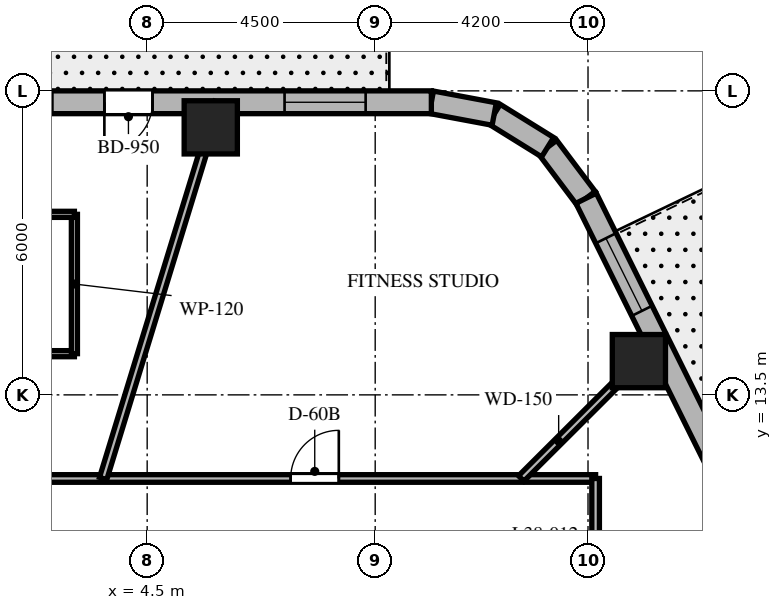
"""IFC4 building model, lengths in metres.
Left out: names, types, materials, properties, quantities, classifications, styles, units other than length and angle.
Written with IfcOpenShell. Run it as: python <this file> out.ifc"""

import sys

from ifc_helpers import new_model, si_unit, direction, frame, frame_2d, origin, origin_2d, place, context, subcontext, project, spatial, rectangle, extrude, element, fill, save


model = new_model("IFC4")
c1 = context("Model", 3, precision=1e-05, world=origin(), true_north=direction((0.0, 1.0)))
c2 = subcontext(c1, "Body", "Model", "MODEL_VIEW")
j1 = project(units=[si_unit("LENGTHUNIT", "METRE"), si_unit("PLANEANGLEUNIT", "RADIAN")], contexts=[c1])
p1 = place(None, origin())
s1 = spatial("IfcSite", under=j1, at=p1, CompositionType="ELEMENT")
p2 = place(p1, origin())
s2 = spatial("IfcBuilding", under=s1, at=p2, CompositionType="ELEMENT")
p3 = place(p2, frame((0.0, 0.0, 155.4)))
s3 = spatial("IfcBuildingStorey", under=s2, at=p3, CompositionType="ELEMENT", Elevation=155.4)
for number, where, z_axis, x_axis in (
    (1, (14.204, 14.166, 0.0), (0.0, 0.0, 1.0), (1.0, 0.0, 0.0)),
    (2, (5.755, 18.78, 0.0), (0.0, 0.0, 1.0), (1.0, 0.0, 0.0)),
):
    element("IfcColumn", number, at=place(p3, frame(where, z_axis=z_axis, x_axis=x_axis)), inside=s3, PredefinedType="COLUMN", context=c2, shape_type="SweptSolid", body=[
        extrude(rectangle(XDim=1.05, YDim=1.05, at=origin_2d()), origin(), (0.0, 0.0, 1.0), 3.7),
    ])
p4 = place(p3, frame((13.162, 17.381, 0.0), z_axis=(0.0, 0.0, 1.0), x_axis=(-0.601515770517, 0.798860925205, 0.0)))
e3 = element("IfcWall", 3, at=p4, inside=s3, PredefinedType="SOLIDWALL", context=c2, shape_type="SweptSolid", body=[
    extrude(rectangle(XDim=1.262, YDim=0.45, at=frame_2d((0.631, 0.0))), origin(), (0.0, 0.0, 1.0), 3.4),
])
p5 = place(p3, frame((12.403, 18.389, 0.0), z_axis=(0.0, 0.0, 1.0), x_axis=(-0.849795170926, 0.527113049991, 0.0)))
e4 = element("IfcWall", 4, at=p5, inside=s3, PredefinedType="SOLIDWALL", context=c2, shape_type="SweptSolid", body=[
    extrude(rectangle(XDim=1.241, YDim=0.45, at=frame_2d((0.62, 0.0))), origin(), (0.0, 0.0, 1.0), 3.4),
])
p6 = place(p3, frame((11.349, 19.043, 0.0), z_axis=(0.0, 0.0, 1.0), x_axis=(-0.982931267051, 0.183973161772, 0.0)))
e5 = element("IfcWall", 5, at=p6, inside=s3, PredefinedType="SOLIDWALL", context=c2, shape_type="SweptSolid", body=[
    extrude(rectangle(XDim=1.262, YDim=0.45, at=frame_2d((0.631, 0.0))), origin(), (0.0, 0.0, 1.0), 3.4),
])
p7 = place(p3, frame((20.618, 2.344, 0.0), z_axis=(0.0, 0.0, 1.0), x_axis=(-0.444243691097, 0.895905990002, 0.0)))
e6 = element("IfcWall", 6, at=p7, inside=s3, PredefinedType="SOLIDWALL", context=c2, shape_type="SweptSolid", body=[
    extrude(rectangle(XDim=16.784, YDim=0.45, at=frame_2d((8.392, 0.0))), origin(), (0.0, 0.0, 1.0), 3.4),
])
p8 = place(p7, frame((4.535, 0.0, 0.0)))
e7 = element("IfcOpeningElement", 7, at=p8, cuts=e6, PredefinedType="OPENING", context=c2, shape_type="SweptSolid", body=[
    extrude(rectangle(XDim=1.0, YDim=2.15, at=frame_2d((0.5, 1.075))), frame((0.0, 0.235, 0.0), z_axis=(0.0, -1.0, 0.0), x_axis=(1.0, 0.0, 0.0)), (0.0, 0.0, 1.0), 0.47),
])
p9 = place(p7, frame((7.642, 0.0, 0.8)))
e8 = element("IfcOpeningElement", 8, at=p9, cuts=e6, PredefinedType="OPENING", context=c2, shape_type="SweptSolid", body=[
    extrude(rectangle(XDim=1.6, YDim=1.75, at=frame_2d((0.8, 0.875))), frame((0.0, 0.235, 0.0), z_axis=(0.0, -1.0, 0.0), x_axis=(1.0, 0.0, 0.0)), (0.0, 0.0, 1.0), 0.47),
])
p10 = place(p7, frame((14.303, 0.0, 0.8)))
e9 = element("IfcOpeningElement", 9, at=p10, cuts=e6, PredefinedType="OPENING", context=c2, shape_type="SweptSolid", body=[
    extrude(rectangle(XDim=1.6, YDim=1.75, at=frame_2d((0.8, 0.875))), frame((0.0, 0.235, 0.0), z_axis=(0.0, -1.0, 0.0), x_axis=(1.0, 0.0, 0.0)), (0.0, 0.0, 1.0), 0.47),
])
p11 = place(p7, frame((0.931, 0.0, 0.8)))
e10 = element("IfcOpeningElement", 10, at=p11, cuts=e6, PredefinedType="OPENING", context=c2, shape_type="SweptSolid", body=[
    extrude(rectangle(XDim=1.6, YDim=1.75, at=frame_2d((0.8, 0.875))), frame((0.0, 0.235, 0.0), z_axis=(0.0, -1.0, 0.0), x_axis=(1.0, 0.0, 0.0)), (0.0, 0.0, 1.0), 0.47),
])
p12 = place(p3, frame((10.108, 19.275, 0.0), z_axis=(0.0, 0.0, 1.0), x_axis=(-1.0, 0.0, 0.0)))
e11 = element("IfcWall", 11, at=p12, inside=s3, PredefinedType="SOLIDWALL", context=c2, shape_type="SweptSolid", body=[
    extrude(rectangle(XDim=21.829, YDim=0.45, at=frame_2d((10.915, 0.0))), origin(), (0.0, 0.0, 1.0), 3.4),
])
p13 = place(p12, frame((5.503, 0.0, 0.0)))
e12 = element("IfcOpeningElement", 12, at=p13, cuts=e11, PredefinedType="OPENING", context=c2, shape_type="SweptSolid", body=[
    extrude(rectangle(XDim=0.95, YDim=2.15, at=frame_2d((0.475, 1.075))), frame((0.0, 0.235, 0.0), z_axis=(0.0, -1.0, 0.0), x_axis=(1.0, 0.0, 0.0)), (0.0, 0.0, 1.0), 0.47),
])
p14 = place(p12, frame((1.297, 0.0, 0.8)))
e13 = element("IfcOpeningElement", 13, at=p14, cuts=e11, PredefinedType="OPENING", context=c2, shape_type="SweptSolid", body=[
    extrude(rectangle(XDim=1.6, YDim=1.75, at=frame_2d((0.8, 0.875))), frame((0.0, 0.235, 0.0), z_axis=(0.0, -1.0, 0.0), x_axis=(1.0, 0.0, 0.0)), (0.0, 0.0, 1.0), 0.47),
])
p15 = place(p12, frame((7.479, 0.0, 0.8)))
e14 = element("IfcOpeningElement", 14, at=p15, cuts=e11, PredefinedType="OPENING", context=c2, shape_type="SweptSolid", body=[
    extrude(rectangle(XDim=1.6, YDim=1.75, at=frame_2d((0.8, 0.875))), frame((0.0, 0.235, 0.0), z_axis=(0.0, -1.0, 0.0), x_axis=(1.0, 0.0, 0.0)), (0.0, 0.0, 1.0), 0.47),
])
p16 = place(p12, frame((13.461, 0.0, 0.8)))
e15 = element("IfcOpeningElement", 15, at=p16, cuts=e11, PredefinedType="OPENING", context=c2, shape_type="SweptSolid", body=[
    extrude(rectangle(XDim=1.6, YDim=1.75, at=frame_2d((0.8, 0.875))), frame((0.0, 0.235, 0.0), z_axis=(0.0, -1.0, 0.0), x_axis=(1.0, 0.0, 0.0)), (0.0, 0.0, 1.0), 0.47),
])
p17 = place(p12, frame((18.933, 0.0, 0.8)))
e16 = element("IfcOpeningElement", 16, at=p17, cuts=e11, PredefinedType="OPENING", context=c2, shape_type="SweptSolid", body=[
    extrude(rectangle(XDim=1.6, YDim=1.75, at=frame_2d((0.8, 0.875))), frame((0.0, 0.235, 0.0), z_axis=(0.0, -1.0, 0.0), x_axis=(1.0, 0.0, 0.0)), (0.0, 0.0, 1.0), 0.47),
])
p18 = place(p3, frame((-13.35, 11.85, 0.0), z_axis=(0.0, 0.0, 1.0), x_axis=(1.0, 0.0, 0.0)))
e17 = element("IfcWall", 17, at=p18, inside=s3, PredefinedType="PARTITIONING", context=c2, shape_type="SweptSolid", body=[
    extrude(rectangle(XDim=26.7, YDim=0.15, at=frame_2d((13.35, 0.0))), origin(), (0.0, 0.0, 1.0), 2.84),
])
p19 = place(p18, frame((20.682, 0.0, 0.0)))
e18 = element("IfcOpeningElement", 18, at=p19, cuts=e17, PredefinedType="OPENING", context=c2, shape_type="SweptSolid", body=[
    extrude(rectangle(XDim=0.95, YDim=2.03, at=frame_2d((0.475, 1.015))), frame((0.0, 0.085, 0.0), z_axis=(0.0, -1.0, 0.0), x_axis=(1.0, 0.0, 0.0)), (0.0, 0.0, 1.0), 0.17),
])
p20 = place(p18, frame((14.229, 0.0, 0.0)))
e19 = element("IfcOpeningElement", 19, at=p20, cuts=e17, PredefinedType="OPENING", context=c2, shape_type="SweptSolid", body=[
    extrude(rectangle(XDim=0.95, YDim=2.03, at=frame_2d((0.475, 1.015))), frame((0.0, 0.085, 0.0), z_axis=(0.0, -1.0, 0.0), x_axis=(1.0, 0.0, 0.0)), (0.0, 0.0, 1.0), 0.17),
])
p21 = place(p18, frame((10.075, 0.0, 0.0)))
e20 = element("IfcOpeningElement", 20, at=p21, cuts=e17, PredefinedType="OPENING", context=c2, shape_type="SweptSolid", body=[
    extrude(rectangle(XDim=0.95, YDim=2.03, at=frame_2d((0.475, 1.015))), frame((0.0, 0.085, 0.0), z_axis=(0.0, -1.0, 0.0), x_axis=(1.0, 0.0, 0.0)), (0.0, 0.0, 1.0), 0.17),
])
p22 = place(p18, frame((3.995, 0.0, 0.0)))
e21 = element("IfcOpeningElement", 21, at=p22, cuts=e17, PredefinedType="OPENING", context=c2, shape_type="SweptSolid", body=[
    extrude(rectangle(XDim=0.95, YDim=2.03, at=frame_2d((0.475, 1.015))), frame((0.0, 0.085, 0.0), z_axis=(0.0, -1.0, 0.0), x_axis=(1.0, 0.0, 0.0)), (0.0, 0.0, 1.0), 0.17),
])
p23 = place(p3, frame((13.35, 11.85, 0.0), z_axis=(0.0, 0.0, 1.0), x_axis=(0.0, -1.0, 0.0)))
e22 = element("IfcWall", 22, at=p23, inside=s3, PredefinedType="PARTITIONING", context=c2, shape_type="SweptSolid", body=[
    extrude(rectangle(XDim=23.7, YDim=0.15, at=frame_2d((11.85, 0.0))), origin(), (0.0, 0.0, 1.0), 2.84),
])
p24 = place(p23, frame((3.765, 0.0, 0.0)))
e23 = element("IfcOpeningElement", 23, at=p24, cuts=e22, PredefinedType="OPENING", context=c2, shape_type="SweptSolid", body=[
    extrude(rectangle(XDim=0.9, YDim=2.03, at=frame_2d((0.45, 1.015))), frame((0.0, 0.085, 0.0), z_axis=(0.0, -1.0, 0.0), x_axis=(1.0, 0.0, 0.0)), (0.0, 0.0, 1.0), 0.17),
])
p25 = place(p23, frame((20.395, 0.0, 0.0)))
e24 = element("IfcOpeningElement", 24, at=p25, cuts=e22, PredefinedType="OPENING", context=c2, shape_type="SweptSolid", body=[
    extrude(rectangle(XDim=0.9, YDim=2.03, at=frame_2d((0.45, 1.015))), frame((0.0, 0.085, 0.0), z_axis=(0.0, -1.0, 0.0), x_axis=(1.0, 0.0, 0.0)), (0.0, 0.0, 1.0), 0.17),
])
p26 = place(p23, frame((15.787, 0.0, 0.0)))
e25 = element("IfcOpeningElement", 25, at=p26, cuts=e22, PredefinedType="OPENING", context=c2, shape_type="SweptSolid", body=[
    extrude(rectangle(XDim=0.95, YDim=2.03, at=frame_2d((0.475, 1.015))), frame((0.0, 0.085, 0.0), z_axis=(0.0, -1.0, 0.0), x_axis=(1.0, 0.0, 0.0)), (0.0, 0.0, 1.0), 0.17),
])
p27 = place(p23, frame((10.751, 0.0, 0.0)))
e26 = element("IfcOpeningElement", 26, at=p27, cuts=e22, PredefinedType="OPENING", context=c2, shape_type="SweptSolid", body=[
    extrude(rectangle(XDim=0.95, YDim=2.03, at=frame_2d((0.475, 1.015))), frame((0.0, 0.085, 0.0), z_axis=(0.0, -1.0, 0.0), x_axis=(1.0, 0.0, 0.0)), (0.0, 0.0, 1.0), 0.17),
])
p28 = place(p3, frame((11.882, 11.85, 0.0), z_axis=(0.0, 0.0, 1.0), x_axis=(0.708037373639, 0.706174962407, 0.0)))
e27 = element("IfcWall", 27, at=p28, inside=s3, PredefinedType="PARTITIONING", context=c2, shape_type="SweptSolid", body=[
    extrude(rectangle(XDim=3.802, YDim=0.15, at=frame_2d((1.901, 0.0))), origin(), (0.0, 0.0, 1.0), 2.64),
])
p29 = place(p3, frame((3.631, 11.85, 0.0), z_axis=(0.0, 0.0, 1.0), x_axis=(0.293007573338, 0.956110120209, 0.0)))
e28 = element("IfcWall", 28, at=p29, inside=s3, PredefinedType="PARTITIONING", context=c2, shape_type="SweptSolid", body=[
    extrude(rectangle(XDim=7.766, YDim=0.15, at=frame_2d((3.883, 0.0))), origin(), (0.0, 0.0, 1.0), 2.64),
])
p30 = place(p3, frame((0.464, 14.313, 0.0), z_axis=(0.0, 0.0, 1.0), x_axis=(1.0, 0.0, 0.0)))
e29 = element("IfcWall", 29, at=p30, inside=s3, PredefinedType="PARTITIONING", context=c2, shape_type="SweptSolid", body=[
    extrude(rectangle(XDim=2.6, YDim=0.12, at=frame_2d((1.3, 0.0))), origin(), (0.0, 0.0, 1.0), 3.4),
])
p31 = place(p30, frame((0.875, 0.0, 0.0)))
e30 = element("IfcOpeningElement", 30, at=p31, cuts=e29, PredefinedType="OPENING", context=c2, shape_type="SweptSolid", body=[
    extrude(rectangle(XDim=0.85, YDim=2.03, at=frame_2d((0.425, 1.015))), frame((0.0, 0.07, 0.0), z_axis=(0.0, -1.0, 0.0), x_axis=(1.0, 0.0, 0.0)), (0.0, 0.0, 1.0), 0.14),
])
p32 = place(p3, frame((3.064, 14.313, 0.0), z_axis=(0.0, 0.0, 1.0), x_axis=(0.0, 1.0, 0.0)))
e31 = element("IfcWall", 31, at=p32, inside=s3, PredefinedType="PARTITIONING", context=c2, shape_type="SweptSolid", body=[
    extrude(rectangle(XDim=2.75, YDim=0.12, at=frame_2d((1.375, 0.0))), origin(), (0.0, 0.0, 1.0), 2.841),
])
p33 = place(p3, frame((3.064, 17.063, 0.0), z_axis=(0.0, 0.0, 1.0), x_axis=(-1.0, 0.0, 0.0)))
e32 = element("IfcWall", 32, at=p33, inside=s3, PredefinedType="PARTITIONING", context=c2, shape_type="SweptSolid", body=[
    extrude(rectangle(XDim=2.6, YDim=0.12, at=frame_2d((1.3, 0.0))), origin(), (0.0, 0.0, 1.0), 3.4),
])
p34 = place(p10, origin())
e33 = element("IfcWindow", 33, at=p34, inside=s3, PartitioningType="SINGLE_PANEL", PredefinedType="WINDOW", context=c2, shape_type="SweptSolid", body=[
    extrude(rectangle(XDim=1.6, YDim=1.75, at=frame_2d((0.8, 0.875))), frame((0.0, 0.03, 0.0), z_axis=(0.0, -1.0, 0.0), x_axis=(1.0, 0.0, 0.0)), (0.0, 0.0, 1.0), 0.06),
])
fill(e9, e33)
p35 = place(p13, origin())
e34 = element("IfcDoor", 34, at=p35, inside=s3, OperationType="SINGLE_SWING_RIGHT", PredefinedType="DOOR", context=c2, shape_type="SweptSolid", body=[
    extrude(rectangle(XDim=0.95, YDim=2.15, at=frame_2d((0.475, 1.075))), frame((0.0, 0.025, 0.0), z_axis=(0.0, -1.0, 0.0), x_axis=(1.0, 0.0, 0.0)), (0.0, 0.0, 1.0), 0.05),
])
fill(e12, e34)
p36 = place(p14, origin())
e35 = element("IfcWindow", 35, at=p36, inside=s3, PartitioningType="SINGLE_PANEL", PredefinedType="WINDOW", context=c2, shape_type="SweptSolid", body=[
    extrude(rectangle(XDim=1.6, YDim=1.75, at=frame_2d((0.8, 0.875))), frame((0.0, 0.03, 0.0), z_axis=(0.0, -1.0, 0.0), x_axis=(1.0, 0.0, 0.0)), (0.0, 0.0, 1.0), 0.06),
])
fill(e13, e35)
p37 = place(p19, origin())
e36 = element("IfcDoor", 36, at=p37, inside=s3, OperationType="SINGLE_SWING_RIGHT", PredefinedType="DOOR", context=c2, shape_type="SweptSolid", body=[
    extrude(rectangle(XDim=0.95, YDim=2.03, at=frame_2d((0.475, 1.015))), frame((0.0, 0.025, 0.0), z_axis=(0.0, -1.0, 0.0), x_axis=(1.0, 0.0, 0.0)), (0.0, 0.0, 1.0), 0.05),
])
fill(e18, e36)
save(model, sys.argv[1])
